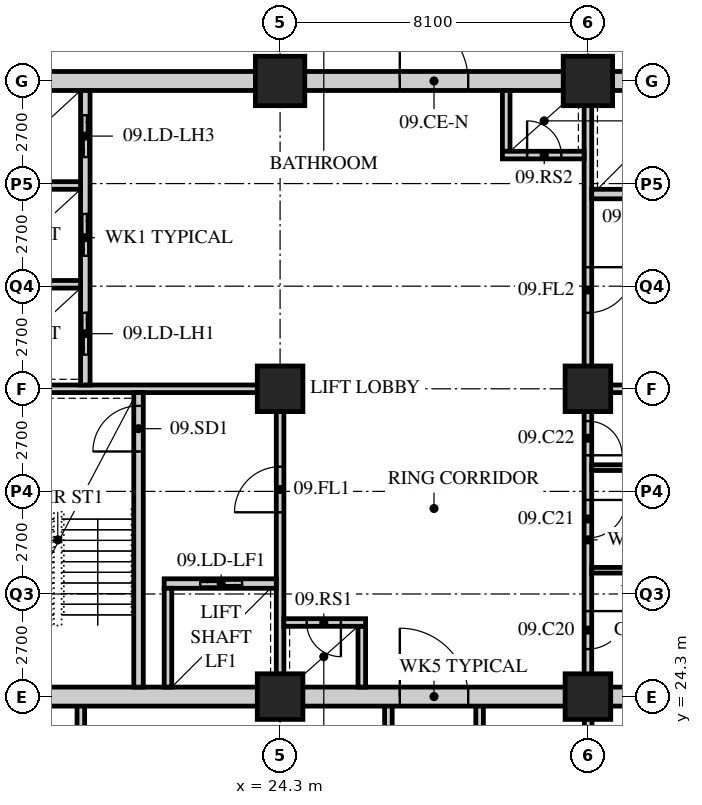
"""IFC4 building model, lengths in metres.
Left out: names, types, materials, properties, quantities, classifications, styles, units other than length and angle.
Written with IfcOpenShell. Run it as: python <this file> out.ifc"""

import sys

from ifc_helpers import new_model, si_unit, direction, frame, frame_2d, origin, origin_2d, place, context, subcontext, project, spatial, rectangle, hollow_rectangle, extrude, element, fill, save


model = new_model("IFC4")
c1 = context("Model", 3, precision=1e-05, world=origin(), true_north=direction((0.0, 1.0)))
c2 = subcontext(c1, "Body", "Model", "MODEL_VIEW")
j1 = project(units=[si_unit("LENGTHUNIT", "METRE"), si_unit("PLANEANGLEUNIT", "RADIAN")], contexts=[c1])
p1 = place(None, origin())
s1 = spatial("IfcSite", under=j1, at=p1, CompositionType="ELEMENT")
p2 = place(p1, origin())
s2 = spatial("IfcBuilding", under=s1, at=p2, CompositionType="ELEMENT")
p3 = place(p2, frame((0.0, 0.0, 43.2)))
s3 = spatial("IfcBuildingStorey", under=s2, at=p3, CompositionType="ELEMENT", Elevation=43.2)
for number, where, z_axis, x_axis in (
    (1, (24.3, 24.3, 0.0), (0.0, 0.0, 1.0), (1.0, 0.0, 0.0)),
    (2, (24.3, 32.4, 0.0), (0.0, 0.0, 1.0), (1.0, 0.0, 0.0)),
):
    element("IfcColumn", number, at=place(p3, frame(where, z_axis=z_axis, x_axis=x_axis)), inside=s3, PredefinedType="COLUMN", context=c2, shape_type="SweptSolid", body=[
        extrude(hollow_rectangle(XDim=1.2, YDim=1.2, WallThickness=0.12, at=origin_2d()), origin(), (0.0, 0.0, 1.0), 3.4),
    ])
p4 = place(p3, frame((24.3, 40.5, 0.0), z_axis=(0.0, 0.0, 1.0), x_axis=(1.0, 0.0, 0.0)))
e3 = element("IfcColumn", 3, at=p4, inside=s3, PredefinedType="COLUMN", context=c2, shape_type="SweptSolid", body=[
    extrude(hollow_rectangle(XDim=1.3, YDim=1.3, WallThickness=0.13, at=origin_2d()), origin(), (0.0, 0.0, 1.0), 3.4),
])
for number, where, z_axis, x_axis in (
    (4, (32.4, 24.3, 0.0), (0.0, 0.0, 1.0), (1.0, 0.0, 0.0)),
    (5, (32.4, 32.4, 0.0), (0.0, 0.0, 1.0), (1.0, 0.0, 0.0)),
):
    element("IfcColumn", number, at=place(p3, frame(where, z_axis=z_axis, x_axis=x_axis)), inside=s3, PredefinedType="COLUMN", context=c2, shape_type="SweptSolid", body=[
        extrude(hollow_rectangle(XDim=1.2, YDim=1.2, WallThickness=0.12, at=origin_2d()), origin(), (0.0, 0.0, 1.0), 3.4),
    ])
p5 = place(p3, frame((32.4, 40.5, 0.0), z_axis=(0.0, 0.0, 1.0), x_axis=(1.0, 0.0, 0.0)))
e6 = element("IfcColumn", 6, at=p5, inside=s3, PredefinedType="COLUMN", context=c2, shape_type="SweptSolid", body=[
    extrude(hollow_rectangle(XDim=1.3, YDim=1.3, WallThickness=0.13, at=origin_2d()), origin(), (0.0, 0.0, 1.0), 3.4),
])
p6 = place(p3, frame((19.057, 18.0, 0.0), z_axis=(0.0, 0.0, 1.0), x_axis=(0.0, 1.0, 0.0)))
e7 = element("IfcWall", 7, at=p6, inside=s3, PredefinedType="SOLIDWALL", context=c2, shape_type="SweptSolid", body=[
    extrude(rectangle(XDim=6.3, YDim=0.2, at=frame_2d((3.15, 0.0))), origin(), (0.0, 0.0, 1.0), 3.19),
])
p7 = place(p3, frame((32.407, 18.0, 0.0), z_axis=(0.0, 0.0, 1.0), x_axis=(0.0, 1.0, 0.0)))
e8 = element("IfcWall", 8, at=p7, inside=s3, PredefinedType="SOLIDWALL", context=c2, shape_type="SweptSolid", body=[
    extrude(rectangle(XDim=6.3, YDim=0.2, at=frame_2d((3.15, 0.0))), origin(), (0.0, 0.0, 1.0), 2.578),
])
for number, where, z_axis, x_axis in (
    (9, (27.15, 18.0, 0.0), (0.0, 0.0, 1.0), (0.0, 1.0, 0.0)),
    (10, (29.55, 18.0, 0.0), (0.0, 0.0, 1.0), (0.0, 1.0, 0.0)),
):
    element("IfcWall", number, at=place(p3, frame(where, z_axis=z_axis, x_axis=x_axis)), inside=s3, PredefinedType="SOLIDWALL", context=c2, shape_type="SweptSolid", body=[
        extrude(rectangle(XDim=6.3, YDim=0.2, at=frame_2d((3.15, 0.0))), origin(), (0.0, 0.0, 1.0), 3.19),
    ])
p8 = place(p3, frame((15.95, 24.3, 0.0), z_axis=(0.0, 0.0, 1.0), x_axis=(1.0, 0.0, 0.0)))
e11 = element("IfcWall", 11, at=p8, inside=s3, PredefinedType="SOLIDWALL", context=c2, shape_type="SweptSolid", body=[
    extrude(rectangle(XDim=24.8, YDim=0.5, at=frame_2d((12.4, 0.0))), origin(), (0.0, 0.0, 1.0), 2.54),
])
p9 = place(p8, frame((11.5, 0.0, 0.0)))
e12 = element("IfcOpeningElement", 12, at=p9, cuts=e11, PredefinedType="OPENING", context=c2, shape_type="SweptSolid", body=[
    extrude(rectangle(XDim=1.8, YDim=2.4, at=frame_2d((0.9, 1.2))), frame((0.0, 0.26, 0.0), z_axis=(0.0, -1.0, 0.0), x_axis=(1.0, 0.0, 0.0)), (0.0, 0.0, 1.0), 0.52),
])
p10 = place(p3, frame((15.95, 40.5, 0.0), z_axis=(0.0, 0.0, 1.0), x_axis=(1.0, 0.0, 0.0)))
e13 = element("IfcWall", 13, at=p10, inside=s3, PredefinedType="SOLIDWALL", context=c2, shape_type="SweptSolid", body=[
    extrude(rectangle(XDim=24.8, YDim=0.5, at=frame_2d((12.4, 0.0))), origin(), (0.0, 0.0, 1.0), 2.54),
])
p11 = place(p10, frame((11.5, 0.0, 0.0)))
e14 = element("IfcOpeningElement", 14, at=p11, cuts=e13, PredefinedType="OPENING", context=c2, shape_type="SweptSolid", body=[
    extrude(rectangle(XDim=1.8, YDim=2.4, at=frame_2d((0.9, 1.2))), frame((0.0, 0.26, 0.0), z_axis=(0.0, -1.0, 0.0), x_axis=(1.0, 0.0, 0.0)), (0.0, 0.0, 1.0), 0.52),
])
p12 = place(p3, frame((16.45, 32.4, 0.0), z_axis=(0.0, 0.0, 1.0), x_axis=(1.0, 0.0, 0.0)))
e15 = element("IfcWall", 15, at=p12, inside=s3, PredefinedType="SOLIDWALL", context=c2, shape_type="SweptSolid", body=[
    extrude(rectangle(XDim=7.95, YDim=0.2, at=frame_2d((3.975, 0.0))), origin(), (0.0, 0.0, 1.0), 2.578),
])
p13 = place(p3, frame((24.3, 24.55, 0.0), z_axis=(0.0, 0.0, 1.0), x_axis=(0.0, 1.0, 0.0)))
e16 = element("IfcWall", 16, at=p13, inside=s3, PredefinedType="SOLIDWALL", context=c2, shape_type="SweptSolid", body=[
    extrude(rectangle(XDim=7.75, YDim=0.2, at=frame_2d((3.875, 0.0))), origin(), (0.0, 0.0, 1.0), 2.578),
])
p14 = place(p13, frame((4.6, 0.0, 0.0)))
e17 = element("IfcOpeningElement", 17, at=p14, cuts=e16, PredefinedType="OPENING", context=c2, shape_type="SweptSolid", body=[
    extrude(rectangle(XDim=1.2, YDim=2.1, at=frame_2d((0.6, 1.05))), frame((0.0, 0.11, 0.0), z_axis=(0.0, -1.0, 0.0), x_axis=(1.0, 0.0, 0.0)), (0.0, 0.0, 1.0), 0.22),
])
p15 = place(p3, frame((20.575, 24.55, 0.0), z_axis=(0.0, 0.0, 1.0), x_axis=(0.0, 1.0, 0.0)))
e18 = element("IfcWall", 18, at=p15, inside=s3, PredefinedType="SOLIDWALL", context=c2, shape_type="SweptSolid", body=[
    extrude(rectangle(XDim=7.75, YDim=0.25, at=frame_2d((3.875, 0.0))), origin(), (0.0, 0.0, 1.0), 3.19),
])
p16 = place(p15, frame((6.2, 0.0, 0.0)))
e19 = element("IfcOpeningElement", 19, at=p16, cuts=e18, PredefinedType="OPENING", context=c2, shape_type="SweptSolid", body=[
    extrude(rectangle(XDim=1.2, YDim=2.1, at=frame_2d((0.6, 1.05))), frame((0.0, 0.135, 0.0), z_axis=(0.0, -1.0, 0.0), x_axis=(1.0, 0.0, 0.0)), (0.0, 0.0, 1.0), 0.27),
])
p17 = place(p3, frame((21.25, 27.275, 0.0), z_axis=(0.0, 0.0, 1.0), x_axis=(1.0, 0.0, 0.0)))
e20 = element("IfcWall", 20, at=p17, inside=s3, PredefinedType="SOLIDWALL", context=c2, shape_type="SweptSolid", body=[
    extrude(rectangle(XDim=2.95, YDim=0.25, at=frame_2d((1.475, 0.0))), origin(), (0.0, 0.0, 1.0), 3.19),
])
p18 = place(p17, frame((0.95, 0.0, 0.0)))
e21 = element("IfcOpeningElement", 21, at=p18, cuts=e20, PredefinedType="OPENING", context=c2, shape_type="SweptSolid", body=[
    extrude(rectangle(XDim=1.1, YDim=2.4, at=frame_2d((0.55, 1.2))), frame((0.0, 0.135, 0.0), z_axis=(0.0, -1.0, 0.0), x_axis=(1.0, 0.0, 0.0)), (0.0, 0.0, 1.0), 0.27),
])
p19 = place(p3, frame((21.35, 24.55, 0.0), z_axis=(0.0, 0.0, 1.0), x_axis=(0.0, 1.0, 0.0)))
e22 = element("IfcWall", 22, at=p19, inside=s3, PredefinedType="SOLIDWALL", context=c2, shape_type="SweptSolid", body=[
    extrude(rectangle(XDim=2.6, YDim=0.2, at=frame_2d((1.3, 0.0))), origin(), (0.0, 0.0, 1.0), 3.19),
])
p20 = place(p3, frame((19.175, 32.5, 0.0), z_axis=(0.0, 0.0, 1.0), x_axis=(0.0, 1.0, 0.0)))
e23 = element("IfcWall", 23, at=p20, inside=s3, PredefinedType="SOLIDWALL", context=c2, shape_type="SweptSolid", body=[
    extrude(rectangle(XDim=7.75, YDim=0.25, at=frame_2d((3.875, 0.0))), origin(), (0.0, 0.0, 1.0), 3.19),
])
p21 = place(p20, frame((0.8, 0.0, 0.0)))
e24 = element("IfcOpeningElement", 24, at=p21, cuts=e23, PredefinedType="OPENING", context=c2, shape_type="SweptSolid", body=[
    extrude(rectangle(XDim=1.1, YDim=2.4, at=frame_2d((0.55, 1.2))), frame((0.0, 0.135, 0.0), z_axis=(0.0, -1.0, 0.0), x_axis=(1.0, 0.0, 0.0)), (0.0, 0.0, 1.0), 0.27),
])
p22 = place(p20, frame((3.4, 0.0, 0.0)))
e25 = element("IfcOpeningElement", 25, at=p22, cuts=e23, PredefinedType="OPENING", context=c2, shape_type="SweptSolid", body=[
    extrude(rectangle(XDim=1.1, YDim=2.4, at=frame_2d((0.55, 1.2))), frame((0.0, 0.135, 0.0), z_axis=(0.0, -1.0, 0.0), x_axis=(1.0, 0.0, 0.0)), (0.0, 0.0, 1.0), 0.27),
])
p23 = place(p20, frame((6.0, 0.0, 0.0)))
e26 = element("IfcOpeningElement", 26, at=p23, cuts=e23, PredefinedType="OPENING", context=c2, shape_type="SweptSolid", body=[
    extrude(rectangle(XDim=1.1, YDim=2.4, at=frame_2d((0.55, 1.2))), frame((0.0, 0.135, 0.0), z_axis=(0.0, -1.0, 0.0), x_axis=(1.0, 0.0, 0.0)), (0.0, 0.0, 1.0), 0.27),
])
for number, where, z_axis, x_axis in (
    (27, (16.45, 35.15, 0.0), (0.0, 0.0, 1.0), (1.0, 0.0, 0.0)),
    (28, (16.45, 37.75, 0.0), (0.0, 0.0, 1.0), (1.0, 0.0, 0.0)),
):
    element("IfcWall", number, at=place(p3, frame(where, z_axis=z_axis, x_axis=x_axis)), inside=s3, PredefinedType="SOLIDWALL", context=c2, shape_type="SweptSolid", body=[
        extrude(rectangle(XDim=2.6, YDim=0.2, at=frame_2d((1.3, 0.0))), origin(), (0.0, 0.0, 1.0), 3.19),
    ])
p24 = place(p3, frame((26.45, 24.55, 0.0), z_axis=(0.0, 0.0, 1.0), x_axis=(0.0, 1.0, 0.0)))
e29 = element("IfcWall", 29, at=p24, inside=s3, PredefinedType="SOLIDWALL", context=c2, shape_type="SweptSolid", body=[
    extrude(rectangle(XDim=1.6, YDim=0.2, at=frame_2d((0.8, 0.0))), origin(), (0.0, 0.0, 1.0), 3.19),
])
p25 = place(p3, frame((24.4, 26.25, 0.0), z_axis=(0.0, 0.0, 1.0), x_axis=(1.0, 0.0, 0.0)))
e30 = element("IfcWall", 30, at=p25, inside=s3, PredefinedType="SOLIDWALL", context=c2, shape_type="SweptSolid", body=[
    extrude(rectangle(XDim=2.15, YDim=0.2, at=frame_2d((1.075, 0.0))), origin(), (0.0, 0.0, 1.0), 3.19),
])
p26 = place(p25, frame((0.6, 0.0, 0.0)))
e31 = element("IfcOpeningElement", 31, at=p26, cuts=e30, PredefinedType="OPENING", context=c2, shape_type="SweptSolid", body=[
    extrude(rectangle(XDim=0.9, YDim=2.1, at=frame_2d((0.45, 1.05))), frame((0.0, 0.11, 0.0), z_axis=(0.0, -1.0, 0.0), x_axis=(1.0, 0.0, 0.0)), (0.0, 0.0, 1.0), 0.22),
])
p27 = place(p3, frame((32.3, 32.4, 0.0), z_axis=(0.0, 0.0, 1.0), x_axis=(1.0, 0.0, 0.0)))
e32 = element("IfcWall", 32, at=p27, inside=s3, PredefinedType="SOLIDWALL", context=c2, shape_type="SweptSolid", body=[
    extrude(rectangle(XDim=7.95, YDim=0.2, at=frame_2d((3.975, 0.0))), origin(), (0.0, 0.0, 1.0), 2.578),
])
p28 = place(p3, frame((32.4, 32.5, 0.0), z_axis=(0.0, 0.0, 1.0), x_axis=(0.0, 1.0, 0.0)))
e33 = element("IfcWall", 33, at=p28, inside=s3, PredefinedType="SOLIDWALL", context=c2, shape_type="SweptSolid", body=[
    extrude(rectangle(XDim=7.75, YDim=0.2, at=frame_2d((3.875, 0.0))), origin(), (0.0, 0.0, 1.0), 2.578),
])
p29 = place(p28, frame((1.9, 0.0, 0.0)))
e34 = element("IfcOpeningElement", 34, at=p29, cuts=e33, PredefinedType="OPENING", context=c2, shape_type="SweptSolid", body=[
    extrude(rectangle(XDim=1.2, YDim=2.1, at=frame_2d((0.6, 1.05))), frame((0.0, 0.11, 0.0), z_axis=(0.0, -1.0, 0.0), x_axis=(1.0, 0.0, 0.0)), (0.0, 0.0, 1.0), 0.22),
])
p30 = place(p3, frame((32.5, 37.525, 0.0), z_axis=(0.0, 0.0, 1.0), x_axis=(1.0, 0.0, 0.0)))
e35 = element("IfcWall", 35, at=p30, inside=s3, PredefinedType="SOLIDWALL", context=c2, shape_type="SweptSolid", body=[
    extrude(rectangle(XDim=2.95, YDim=0.25, at=frame_2d((1.475, 0.0))), origin(), (0.0, 0.0, 1.0), 3.19),
])
p31 = place(p30, frame((0.9, 0.0, 0.0)))
e36 = element("IfcOpeningElement", 36, at=p31, cuts=e35, PredefinedType="OPENING", context=c2, shape_type="SweptSolid", body=[
    extrude(rectangle(XDim=1.1, YDim=2.4, at=frame_2d((0.55, 1.2))), frame((0.0, 0.135, 0.0), z_axis=(0.0, -1.0, 0.0), x_axis=(1.0, 0.0, 0.0)), (0.0, 0.0, 1.0), 0.27),
])
p32 = place(p3, frame((30.25, 38.65, 0.0), z_axis=(0.0, 0.0, 1.0), x_axis=(0.0, 1.0, 0.0)))
e37 = element("IfcWall", 37, at=p32, inside=s3, PredefinedType="SOLIDWALL", context=c2, shape_type="SweptSolid", body=[
    extrude(rectangle(XDim=1.6, YDim=0.2, at=frame_2d((0.8, 0.0))), origin(), (0.0, 0.0, 1.0), 3.19),
])
p33 = place(p3, frame((30.15, 38.55, 0.0), z_axis=(0.0, 0.0, 1.0), x_axis=(1.0, 0.0, 0.0)))
e38 = element("IfcWall", 38, at=p33, inside=s3, PredefinedType="SOLIDWALL", context=c2, shape_type="SweptSolid", body=[
    extrude(rectangle(XDim=2.15, YDim=0.2, at=frame_2d((1.075, 0.0))), origin(), (0.0, 0.0, 1.0), 3.19),
])
p34 = place(p33, frame((0.65, 0.0, 0.0)))
e39 = element("IfcOpeningElement", 39, at=p34, cuts=e38, PredefinedType="OPENING", context=c2, shape_type="SweptSolid", body=[
    extrude(rectangle(XDim=0.9, YDim=2.1, at=frame_2d((0.45, 1.05))), frame((0.0, 0.11, 0.0), z_axis=(0.0, -1.0, 0.0), x_axis=(1.0, 0.0, 0.0)), (0.0, 0.0, 1.0), 0.22),
])
p35 = place(p3, frame((32.4, 24.55, 0.0), z_axis=(0.0, 0.0, 1.0), x_axis=(0.0, 1.0, 0.0)))
e40 = element("IfcWall", 40, at=p35, inside=s3, PredefinedType="PARTITIONING", context=c2, shape_type="SweptSolid", body=[
    extrude(rectangle(XDim=7.75, YDim=0.2, at=frame_2d((3.875, 0.0))), origin(), (0.0, 0.0, 1.0), 2.578),
])
p36 = place(p35, frame((1.0, 0.0, 0.0)))
e41 = element("IfcOpeningElement", 41, at=p36, cuts=e40, PredefinedType="OPENING", context=c2, shape_type="SweptSolid", body=[
    extrude(rectangle(XDim=1.0, YDim=2.1, at=frame_2d((0.5, 1.05))), frame((0.0, 0.11, 0.0), z_axis=(0.0, -1.0, 0.0), x_axis=(1.0, 0.0, 0.0)), (0.0, 0.0, 1.0), 0.22),
])
p37 = place(p35, frame((3.925, 0.0, 0.0)))
e42 = element("IfcOpeningElement", 42, at=p37, cuts=e40, PredefinedType="OPENING", context=c2, shape_type="SweptSolid", body=[
    extrude(rectangle(XDim=1.0, YDim=2.1, at=frame_2d((0.5, 1.05))), frame((0.0, 0.11, 0.0), z_axis=(0.0, -1.0, 0.0), x_axis=(1.0, 0.0, 0.0)), (0.0, 0.0, 1.0), 0.22),
])
p38 = place(p35, frame((6.1, 0.0, 0.0)))
e43 = element("IfcOpeningElement", 43, at=p38, cuts=e40, PredefinedType="OPENING", context=c2, shape_type="SweptSolid", body=[
    extrude(rectangle(XDim=0.9, YDim=2.1, at=frame_2d((0.45, 1.05))), frame((0.0, 0.11, 0.0), z_axis=(0.0, -1.0, 0.0), x_axis=(1.0, 0.0, 0.0)), (0.0, 0.0, 1.0), 0.22),
])
for number, where, z_axis, x_axis in (
    (44, (32.5, 27.625, 0.0), (0.0, 0.0, 1.0), (1.0, 0.0, 0.0)),
    (45, (32.5, 30.325, 0.0), (0.0, 0.0, 1.0), (1.0, 0.0, 0.0)),
):
    element("IfcWall", number, at=place(p3, frame(where, z_axis=z_axis, x_axis=x_axis)), inside=s3, PredefinedType="PARTITIONING", context=c2, shape_type="SweptSolid", body=[
        extrude(rectangle(XDim=4.9, YDim=0.15, at=frame_2d((2.45, 0.0))), origin(), (0.0, 0.0, 1.0), 3.19),
    ])
p39 = place(p36, origin())
e46 = element("IfcDoor", 46, at=p39, inside=s3, OperationType="SINGLE_SWING_LEFT", PredefinedType="DOOR", context=c2, shape_type="SweptSolid", body=[
    extrude(rectangle(XDim=1.0, YDim=2.1, at=frame_2d((0.5, 1.05))), frame((0.0, 0.025, 0.0), z_axis=(0.0, -1.0, 0.0), x_axis=(1.0, 0.0, 0.0)), (0.0, 0.0, 1.0), 0.05),
])
fill(e41, e46)
p40 = place(p37, origin())
e47 = element("IfcDoor", 47, at=p40, inside=s3, OperationType="SINGLE_SWING_LEFT", PredefinedType="DOOR", context=c2, shape_type="SweptSolid", body=[
    extrude(rectangle(XDim=1.0, YDim=2.1, at=frame_2d((0.5, 1.05))), frame((0.0, 0.025, 0.0), z_axis=(0.0, -1.0, 0.0), x_axis=(1.0, 0.0, 0.0)), (0.0, 0.0, 1.0), 0.05),
])
fill(e42, e47)
p41 = place(p38, origin())
e48 = element("IfcDoor", 48, at=p41, inside=s3, OperationType="SINGLE_SWING_RIGHT", PredefinedType="DOOR", context=c2, shape_type="SweptSolid", body=[
    extrude(rectangle(XDim=0.9, YDim=2.1, at=frame_2d((0.45, 1.05))), frame((0.0, 0.025, 0.0), z_axis=(0.0, -1.0, 0.0), x_axis=(1.0, 0.0, 0.0)), (0.0, 0.0, 1.0), 0.05),
])
fill(e43, e48)
p42 = place(p16, origin())
e49 = element("IfcDoor", 49, at=p42, inside=s3, OperationType="SINGLE_SWING_LEFT", PredefinedType="DOOR", context=c2, shape_type="SweptSolid", body=[
    extrude(rectangle(XDim=1.2, YDim=2.1, at=frame_2d((0.6, 1.05))), frame((0.0, 0.025, 0.0), z_axis=(0.0, -1.0, 0.0), x_axis=(1.0, 0.0, 0.0)), (0.0, 0.0, 1.0), 0.05),
])
fill(e19, e49)
p43 = place(p14, origin())
e50 = element("IfcDoor", 50, at=p43, inside=s3, OperationType="SINGLE_SWING_LEFT", PredefinedType="DOOR", context=c2, shape_type="SweptSolid", body=[
    extrude(rectangle(XDim=1.2, YDim=2.1, at=frame_2d((0.6, 1.05))), frame((0.0, 0.025, 0.0), z_axis=(0.0, -1.0, 0.0), x_axis=(1.0, 0.0, 0.0)), (0.0, 0.0, 1.0), 0.05),
])
fill(e17, e50)
p44 = place(p26, origin())
e51 = element("IfcDoor", 51, at=p44, inside=s3, OperationType="SINGLE_SWING_LEFT", PredefinedType="DOOR", context=c2, shape_type="SweptSolid", body=[
    extrude(rectangle(XDim=0.9, YDim=2.1, at=frame_2d((0.45, 1.05))), frame((0.0, 0.025, 0.0), z_axis=(0.0, -1.0, 0.0), x_axis=(1.0, 0.0, 0.0)), (0.0, 0.0, 1.0), 0.05),
])
fill(e31, e51)
p45 = place(p29, origin())
e52 = element("IfcDoor", 52, at=p45, inside=s3, OperationType="SINGLE_SWING_LEFT", PredefinedType="DOOR", context=c2, shape_type="SweptSolid", body=[
    extrude(rectangle(XDim=1.2, YDim=2.1, at=frame_2d((0.6, 1.05))), frame((0.0, 0.025, 0.0), z_axis=(0.0, -1.0, 0.0), x_axis=(1.0, 0.0, 0.0)), (0.0, 0.0, 1.0), 0.05),
])
fill(e34, e52)
p46 = place(p34, origin())
e53 = element("IfcDoor", 53, at=p46, inside=s3, OperationType="SINGLE_SWING_LEFT", PredefinedType="DOOR", context=c2, shape_type="SweptSolid", body=[
    extrude(rectangle(XDim=0.9, YDim=2.1, at=frame_2d((0.45, 1.05))), frame((0.0, 0.025, 0.0), z_axis=(0.0, -1.0, 0.0), x_axis=(1.0, 0.0, 0.0)), (0.0, 0.0, 1.0), 0.05),
])
fill(e39, e53)
p47 = place(p21, origin())
e54 = element("IfcDoor", 54, at=p47, inside=s3, OperationType="DOUBLE_DOOR_SLIDING", PredefinedType="DOOR", context=c2, shape_type="SweptSolid", body=[
    extrude(rectangle(XDim=1.1, YDim=2.4, at=frame_2d((0.55, 1.2))), frame((0.0, 0.025, 0.0), z_axis=(0.0, -1.0, 0.0), x_axis=(1.0, 0.0, 0.0)), (0.0, 0.0, 1.0), 0.05),
])
fill(e24, e54)
p48 = place(p22, origin())
e55 = element("IfcDoor", 55, at=p48, inside=s3, OperationType="DOUBLE_DOOR_SLIDING", PredefinedType="DOOR", context=c2, shape_type="SweptSolid", body=[
    extrude(rectangle(XDim=1.1, YDim=2.4, at=frame_2d((0.55, 1.2))), frame((0.0, 0.025, 0.0), z_axis=(0.0, -1.0, 0.0), x_axis=(1.0, 0.0, 0.0)), (0.0, 0.0, 1.0), 0.05),
])
fill(e25, e55)
p49 = place(p23, origin())
e56 = element("IfcDoor", 56, at=p49, inside=s3, OperationType="DOUBLE_DOOR_SLIDING", PredefinedType="DOOR", context=c2, shape_type="SweptSolid", body=[
    extrude(rectangle(XDim=1.1, YDim=2.4, at=frame_2d((0.55, 1.2))), frame((0.0, 0.025, 0.0), z_axis=(0.0, -1.0, 0.0), x_axis=(1.0, 0.0, 0.0)), (0.0, 0.0, 1.0), 0.05),
])
fill(e26, e56)
p50 = place(p18, origin())
e57 = element("IfcDoor", 57, at=p50, inside=s3, OperationType="DOUBLE_DOOR_SLIDING", PredefinedType="DOOR", context=c2, shape_type="SweptSolid", body=[
    extrude(rectangle(XDim=1.1, YDim=2.4, at=frame_2d((0.55, 1.2))), frame((0.0, 0.025, 0.0), z_axis=(0.0, -1.0, 0.0), x_axis=(1.0, 0.0, 0.0)), (0.0, 0.0, 1.0), 0.05),
])
fill(e21, e57)
p51 = place(p9, origin())
e58 = element("IfcDoor", 58, at=p51, inside=s3, OperationType="DOUBLE_DOOR_SINGLE_SWING", PredefinedType="DOOR", context=c2, shape_type="SweptSolid", body=[
    extrude(rectangle(XDim=1.8, YDim=2.4, at=frame_2d((0.9, 1.2))), frame((0.0, 0.025, 0.0), z_axis=(0.0, -1.0, 0.0), x_axis=(1.0, 0.0, 0.0)), (0.0, 0.0, 1.0), 0.05),
])
fill(e12, e58)
p52 = place(p11, origin())
e59 = element("IfcDoor", 59, at=p52, inside=s3, OperationType="DOUBLE_DOOR_SINGLE_SWING", PredefinedType="DOOR", context=c2, shape_type="SweptSolid", body=[
    extrude(rectangle(XDim=1.8, YDim=2.4, at=frame_2d((0.9, 1.2))), frame((0.0, 0.025, 0.0), z_axis=(0.0, -1.0, 0.0), x_axis=(1.0, 0.0, 0.0)), (0.0, 0.0, 1.0), 0.05),
])
fill(e14, e59)
save(model, sys.argv[1])
